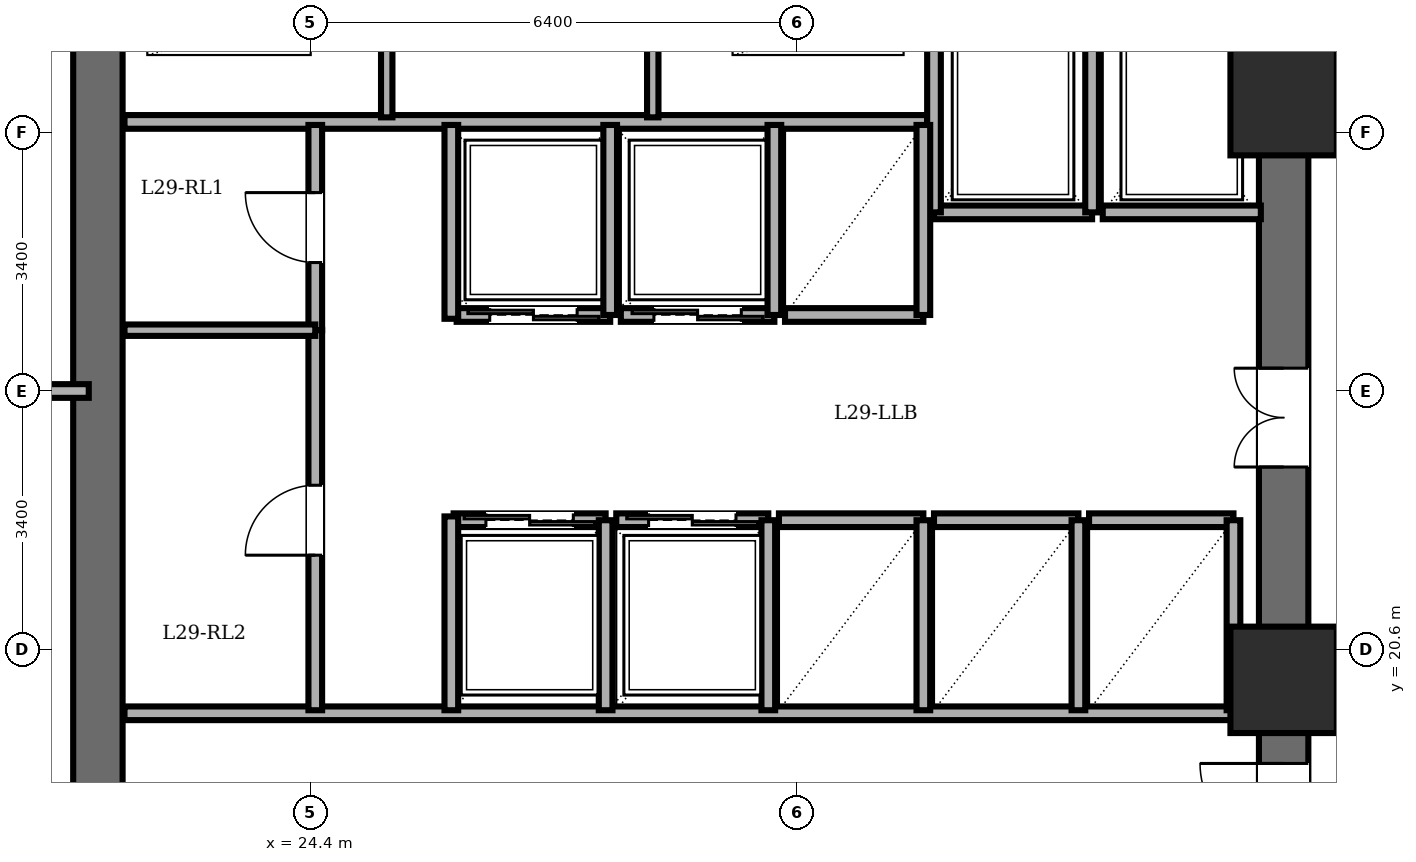
"""IFC4 building model, lengths in metres.
Left out: names, types, materials, properties, quantities, classifications, styles, units other than length and angle.
Written with IfcOpenShell. Run it as: python <this file> out.ifc"""

import sys

from ifc_helpers import new_model, si_unit, direction, frame, frame_2d, origin, origin_2d, place, context, subcontext, project, spatial, rectangle, extrude, element, fill, save


model = new_model("IFC4")
c1 = context("Model", 3, precision=1e-05, world=origin(), true_north=direction((0.0, 1.0)))
c2 = subcontext(c1, "Body", "Model", "MODEL_VIEW")
j1 = project(units=[si_unit("LENGTHUNIT", "METRE"), si_unit("PLANEANGLEUNIT", "RADIAN")], contexts=[c1])
p1 = place(None, origin())
s1 = spatial("IfcSite", under=j1, at=p1, CompositionType="ELEMENT")
p2 = place(p1, origin())
s2 = spatial("IfcBuilding", under=s1, at=p2, CompositionType="ELEMENT")
p3 = place(p2, frame((0.0, 0.0, 111.5)))
s3 = spatial("IfcBuildingStorey", under=s2, at=p3, CompositionType="ELEMENT", Elevation=111.5)
for number, where, z_axis, x_axis in (
    (1, (37.2, 20.2, 0.0), (0.0, 0.0, 1.0), (1.0, 0.0, 0.0)),
    (2, (37.2, 27.8, 0.0), (0.0, 0.0, 1.0), (1.0, 0.0, 0.0)),
):
    element("IfcColumn", number, at=place(p3, frame(where, z_axis=z_axis, x_axis=x_axis)), inside=s3, PredefinedType="COLUMN", context=c2, shape_type="SweptSolid", body=[
        extrude(rectangle(XDim=1.4, YDim=1.4, at=origin_2d()), origin(), (0.0, 0.0, 1.0), 3.6),
    ])
p4 = place(p3, frame((21.6, 14.4, 0.0), z_axis=(0.0, 0.0, 1.0), x_axis=(0.0, 1.0, 0.0)))
e3 = element("IfcWall", 3, at=p4, inside=s3, PredefinedType="SHEAR", context=c2, shape_type="SweptSolid", body=[
    extrude(rectangle(XDim=19.2, YDim=0.65, at=frame_2d((9.6, 0.0))), origin(), (0.0, 0.0, 1.0), 3.4),
])
p5 = place(p3, frame((37.2, 14.4, 0.0), z_axis=(0.0, 0.0, 1.0), x_axis=(0.0, 1.0, 0.0)))
e4 = element("IfcWall", 4, at=p5, inside=s3, PredefinedType="SHEAR", context=c2, shape_type="SweptSolid", body=[
    extrude(rectangle(XDim=19.2, YDim=0.65, at=frame_2d((9.6, 0.0))), origin(), (0.0, 0.0, 1.0), 3.4),
])
p6 = place(p5, frame((15.8, 0.0, 0.0)))
e5 = element("IfcOpeningElement", 5, at=p6, cuts=e4, PredefinedType="OPENING", context=c2, shape_type="SweptSolid", body=[
    extrude(rectangle(XDim=1.15, YDim=2.15, at=frame_2d((0.575, 1.075))), frame((0.0, 0.335, 0.0), z_axis=(0.0, -1.0, 0.0), x_axis=(1.0, 0.0, 0.0)), (0.0, 0.0, 1.0), 0.67),
])
p7 = place(p5, frame((3.6, 0.0, 0.0)))
e6 = element("IfcOpeningElement", 6, at=p7, cuts=e4, PredefinedType="OPENING", context=c2, shape_type="SweptSolid", body=[
    extrude(rectangle(XDim=1.1, YDim=2.15, at=frame_2d((0.55, 1.075))), frame((0.0, 0.335, 0.0), z_axis=(0.0, -1.0, 0.0), x_axis=(1.0, 0.0, 0.0)), (0.0, 0.0, 1.0), 0.67),
])
p8 = place(p5, frame((8.6, 0.0, 0.0)))
e7 = element("IfcOpeningElement", 7, at=p8, cuts=e4, PredefinedType="OPENING", context=c2, shape_type="SweptSolid", body=[
    extrude(rectangle(XDim=1.3, YDim=2.2, at=frame_2d((0.65, 1.1))), frame((0.0, 0.335, 0.0), z_axis=(0.0, -1.0, 0.0), x_axis=(1.0, 0.0, 0.0)), (0.0, 0.0, 1.0), 0.67),
])
p9 = place(p3, frame((21.95, 27.54, 0.0), z_axis=(0.0, 0.0, 1.0), x_axis=(1.0, 0.0, 0.0)))
e8 = element("IfcWall", 8, at=p9, inside=s3, PredefinedType="PARTITIONING", context=c2, shape_type="SweptSolid", body=[
    extrude(rectangle(XDim=10.56, YDim=0.18, at=frame_2d((5.28, 0.0))), origin(), (0.0, 0.0, 1.0), 3.4),
])
for number, where, z_axis, x_axis in (
    (9, (25.4, 27.6, 0.0), (0.0, 0.0, 1.0), (0.0, 1.0, 0.0)),
    (10, (28.9, 27.6, 0.0), (0.0, 0.0, 1.0), (0.0, 1.0, 0.0)),
):
    element("IfcWall", number, at=place(p3, frame(where, z_axis=z_axis, x_axis=x_axis)), inside=s3, PredefinedType="PARTITIONING", context=c2, shape_type="SweptSolid", body=[
        extrude(rectangle(XDim=1.52, YDim=0.15, at=frame_2d((0.76, 0.0))), origin(), (0.0, 0.0, 1.0), 3.4),
    ])
p10 = place(p3, frame((21.95, 19.76, 0.0), z_axis=(0.0, 0.0, 1.0), x_axis=(1.0, 0.0, 0.0)))
e11 = element("IfcWall", 11, at=p10, inside=s3, PredefinedType="PARTITIONING", context=c2, shape_type="SweptSolid", body=[
    extrude(rectangle(XDim=14.87, YDim=0.18, at=frame_2d((7.435, 0.0))), origin(), (0.0, 0.0, 1.0), 3.4),
])
p11 = place(p3, frame((34.68, 26.35, 0.0), z_axis=(0.0, 0.0, 1.0), x_axis=(-1.0, 0.0, 0.0)))
e12 = element("IfcWall", 12, at=p11, inside=s3, PredefinedType="PARTITIONING", context=c2, shape_type="SweptSolid", body=[
    extrude(rectangle(XDim=2.08, YDim=0.18, at=frame_2d((1.04, 0.0))), origin(), (0.0, 0.0, 1.0), 3.4),
])
for number, where, z_axis, x_axis in (
    (13, (34.68, 26.35, 0.0), (0.0, 0.0, 1.0), (0.0, 1.0, 0.0)),
    (14, (32.6, 29.08, 0.0), (0.0, 0.0, 1.0), (0.0, -1.0, 0.0)),
):
    element("IfcWall", number, at=place(p3, frame(where, z_axis=z_axis, x_axis=x_axis)), inside=s3, PredefinedType="PARTITIONING", context=c2, shape_type="SweptSolid", body=[
        extrude(rectangle(XDim=2.73, YDim=0.18, at=frame_2d((1.365, 0.0))), origin(), (0.0, 0.0, 1.0), 3.4),
    ])
p12 = place(p3, frame((36.9, 26.35, 0.0), z_axis=(0.0, 0.0, 1.0), x_axis=(-1.0, 0.0, 0.0)))
e15 = element("IfcWall", 15, at=p12, inside=s3, PredefinedType="PARTITIONING", context=c2, shape_type="SweptSolid", body=[
    extrude(rectangle(XDim=2.08, YDim=0.18, at=frame_2d((1.04, 0.0))), origin(), (0.0, 0.0, 1.0), 3.4),
])
p13 = place(p3, frame((28.34, 25.0, 0.0), z_axis=(0.0, 0.0, 1.0), x_axis=(-1.0, 0.0, 0.0)))
e16 = element("IfcWall", 16, at=p13, inside=s3, PredefinedType="PARTITIONING", context=c2, shape_type="SweptSolid", body=[
    extrude(rectangle(XDim=2.02, YDim=0.18, at=frame_2d((1.01, 0.0))), origin(), (0.0, 0.0, 1.0), 3.4),
])
p14 = place(p13, frame((0.435, 0.0, 0.0)))
e17 = element("IfcOpeningElement", 17, at=p14, cuts=e16, PredefinedType="OPENING", context=c2, shape_type="SweptSolid", body=[
    extrude(rectangle(XDim=1.15, YDim=2.2, at=frame_2d((0.575, 1.1))), frame((0.0, 0.1, 0.0), z_axis=(0.0, -1.0, 0.0), x_axis=(1.0, 0.0, 0.0)), (0.0, 0.0, 1.0), 0.2),
])
p15 = place(p3, frame((28.34, 25.0, 0.0), z_axis=(0.0, 0.0, 1.0), x_axis=(0.0, 1.0, 0.0)))
e18 = element("IfcWall", 18, at=p15, inside=s3, PredefinedType="PARTITIONING", context=c2, shape_type="SweptSolid", body=[
    extrude(rectangle(XDim=2.5, YDim=0.18, at=frame_2d((1.25, 0.0))), origin(), (0.0, 0.0, 1.0), 3.4),
])
p16 = place(p3, frame((30.5, 25.0, 0.0), z_axis=(0.0, 0.0, 1.0), x_axis=(-1.0, 0.0, 0.0)))
e19 = element("IfcWall", 19, at=p16, inside=s3, PredefinedType="PARTITIONING", context=c2, shape_type="SweptSolid", body=[
    extrude(rectangle(XDim=2.02, YDim=0.18, at=frame_2d((1.01, 0.0))), origin(), (0.0, 0.0, 1.0), 3.4),
])
p17 = place(p16, frame((0.435, 0.0, 0.0)))
e20 = element("IfcOpeningElement", 20, at=p17, cuts=e19, PredefinedType="OPENING", context=c2, shape_type="SweptSolid", body=[
    extrude(rectangle(XDim=1.15, YDim=2.2, at=frame_2d((0.575, 1.1))), frame((0.0, 0.1, 0.0), z_axis=(0.0, -1.0, 0.0), x_axis=(1.0, 0.0, 0.0)), (0.0, 0.0, 1.0), 0.2),
])
p18 = place(p3, frame((30.5, 25.0, 0.0), z_axis=(0.0, 0.0, 1.0), x_axis=(0.0, 1.0, 0.0)))
e21 = element("IfcWall", 21, at=p18, inside=s3, PredefinedType="PARTITIONING", context=c2, shape_type="SweptSolid", body=[
    extrude(rectangle(XDim=2.5, YDim=0.18, at=frame_2d((1.25, 0.0))), origin(), (0.0, 0.0, 1.0), 3.4),
])
p19 = place(p3, frame((26.28, 22.3, 0.0), z_axis=(0.0, 0.0, 1.0), x_axis=(1.0, 0.0, 0.0)))
e22 = element("IfcWall", 22, at=p19, inside=s3, PredefinedType="PARTITIONING", context=c2, shape_type="SweptSolid", body=[
    extrude(rectangle(XDim=2.0, YDim=0.18, at=frame_2d((1.0, 0.0))), origin(), (0.0, 0.0, 1.0), 3.4),
])
p20 = place(p19, frame((0.425, 0.0, 0.0)))
e23 = element("IfcOpeningElement", 23, at=p20, cuts=e22, PredefinedType="OPENING", context=c2, shape_type="SweptSolid", body=[
    extrude(rectangle(XDim=1.15, YDim=2.2, at=frame_2d((0.575, 1.1))), frame((0.0, 0.1, 0.0), z_axis=(0.0, -1.0, 0.0), x_axis=(1.0, 0.0, 0.0)), (0.0, 0.0, 1.0), 0.2),
])
p21 = place(p3, frame((28.28, 19.8, 0.0), z_axis=(0.0, 0.0, 1.0), x_axis=(0.0, 1.0, 0.0)))
e24 = element("IfcWall", 24, at=p21, inside=s3, PredefinedType="PARTITIONING", context=c2, shape_type="SweptSolid", body=[
    extrude(rectangle(XDim=2.5, YDim=0.18, at=frame_2d((1.25, 0.0))), origin(), (0.0, 0.0, 1.0), 3.4),
])
p22 = place(p3, frame((28.42, 22.3, 0.0), z_axis=(0.0, 0.0, 1.0), x_axis=(1.0, 0.0, 0.0)))
e25 = element("IfcWall", 25, at=p22, inside=s3, PredefinedType="PARTITIONING", context=c2, shape_type="SweptSolid", body=[
    extrude(rectangle(XDim=2.0, YDim=0.18, at=frame_2d((1.0, 0.0))), origin(), (0.0, 0.0, 1.0), 3.4),
])
p23 = place(p22, frame((0.425, 0.0, 0.0)))
e26 = element("IfcOpeningElement", 26, at=p23, cuts=e25, PredefinedType="OPENING", context=c2, shape_type="SweptSolid", body=[
    extrude(rectangle(XDim=1.15, YDim=2.2, at=frame_2d((0.575, 1.1))), frame((0.0, 0.1, 0.0), z_axis=(0.0, -1.0, 0.0), x_axis=(1.0, 0.0, 0.0)), (0.0, 0.0, 1.0), 0.2),
])
p24 = place(p3, frame((30.42, 19.8, 0.0), z_axis=(0.0, 0.0, 1.0), x_axis=(0.0, 1.0, 0.0)))
e27 = element("IfcWall", 27, at=p24, inside=s3, PredefinedType="PARTITIONING", context=c2, shape_type="SweptSolid", body=[
    extrude(rectangle(XDim=2.5, YDim=0.18, at=frame_2d((1.25, 0.0))), origin(), (0.0, 0.0, 1.0), 3.4),
])
p25 = place(p3, frame((32.46, 25.0, 0.0), z_axis=(0.0, 0.0, 1.0), x_axis=(-1.0, 0.0, 0.0)))
e28 = element("IfcWall", 28, at=p25, inside=s3, PredefinedType="PARTITIONING", context=c2, shape_type="SweptSolid", body=[
    extrude(rectangle(XDim=1.82, YDim=0.18, at=frame_2d((0.91, 0.0))), origin(), (0.0, 0.0, 1.0), 3.4),
])
p26 = place(p3, frame((32.46, 25.0, 0.0), z_axis=(0.0, 0.0, 1.0), x_axis=(0.0, 1.0, 0.0)))
e29 = element("IfcWall", 29, at=p26, inside=s3, PredefinedType="PARTITIONING", context=c2, shape_type="SweptSolid", body=[
    extrude(rectangle(XDim=2.5, YDim=0.18, at=frame_2d((1.25, 0.0))), origin(), (0.0, 0.0, 1.0), 3.4),
])
p27 = place(p3, frame((30.56, 22.3, 0.0), z_axis=(0.0, 0.0, 1.0), x_axis=(1.0, 0.0, 0.0)))
e30 = element("IfcWall", 30, at=p27, inside=s3, PredefinedType="PARTITIONING", context=c2, shape_type="SweptSolid", body=[
    extrude(rectangle(XDim=1.9, YDim=0.18, at=frame_2d((0.95, 0.0))), origin(), (0.0, 0.0, 1.0), 3.4),
])
p28 = place(p3, frame((32.46, 19.8, 0.0), z_axis=(0.0, 0.0, 1.0), x_axis=(0.0, 1.0, 0.0)))
e31 = element("IfcWall", 31, at=p28, inside=s3, PredefinedType="PARTITIONING", context=c2, shape_type="SweptSolid", body=[
    extrude(rectangle(XDim=2.5, YDim=0.18, at=frame_2d((1.25, 0.0))), origin(), (0.0, 0.0, 1.0), 3.4),
])
p29 = place(p3, frame((32.6, 22.3, 0.0), z_axis=(0.0, 0.0, 1.0), x_axis=(1.0, 0.0, 0.0)))
e32 = element("IfcWall", 32, at=p29, inside=s3, PredefinedType="PARTITIONING", context=c2, shape_type="SweptSolid", body=[
    extrude(rectangle(XDim=1.9, YDim=0.18, at=frame_2d((0.95, 0.0))), origin(), (0.0, 0.0, 1.0), 3.4),
])
p30 = place(p3, frame((34.5, 19.8, 0.0), z_axis=(0.0, 0.0, 1.0), x_axis=(0.0, 1.0, 0.0)))
e33 = element("IfcWall", 33, at=p30, inside=s3, PredefinedType="PARTITIONING", context=c2, shape_type="SweptSolid", body=[
    extrude(rectangle(XDim=2.5, YDim=0.18, at=frame_2d((1.25, 0.0))), origin(), (0.0, 0.0, 1.0), 3.4),
])
p31 = place(p3, frame((34.64, 22.3, 0.0), z_axis=(0.0, 0.0, 1.0), x_axis=(1.0, 0.0, 0.0)))
e34 = element("IfcWall", 34, at=p31, inside=s3, PredefinedType="PARTITIONING", context=c2, shape_type="SweptSolid", body=[
    extrude(rectangle(XDim=1.9, YDim=0.18, at=frame_2d((0.95, 0.0))), origin(), (0.0, 0.0, 1.0), 3.4),
])
p32 = place(p3, frame((36.54, 19.8, 0.0), z_axis=(0.0, 0.0, 1.0), x_axis=(0.0, 1.0, 0.0)))
e35 = element("IfcWall", 35, at=p32, inside=s3, PredefinedType="PARTITIONING", context=c2, shape_type="SweptSolid", body=[
    extrude(rectangle(XDim=2.5, YDim=0.18, at=frame_2d((1.25, 0.0))), origin(), (0.0, 0.0, 1.0), 3.4),
])
p33 = place(p3, frame((24.46, 24.8, 0.0), z_axis=(0.0, 0.0, 1.0), x_axis=(0.0, 1.0, 0.0)))
e36 = element("IfcWall", 36, at=p33, inside=s3, PredefinedType="PARTITIONING", context=c2, shape_type="SweptSolid", body=[
    extrude(rectangle(XDim=2.7, YDim=0.18, at=frame_2d((1.35, 0.0))), origin(), (0.0, 0.0, 1.0), 3.4),
])
p34 = place(p33, frame((0.89, 0.0, 0.0)))
e37 = element("IfcOpeningElement", 37, at=p34, cuts=e36, PredefinedType="OPENING", context=c2, shape_type="SweptSolid", body=[
    extrude(rectangle(XDim=0.92, YDim=2.1, at=frame_2d((0.46, 1.05))), frame((0.0, 0.1, 0.0), z_axis=(0.0, -1.0, 0.0), x_axis=(1.0, 0.0, 0.0)), (0.0, 0.0, 1.0), 0.2),
])
p35 = place(p3, frame((24.46, 19.8, 0.0), z_axis=(0.0, 0.0, 1.0), x_axis=(0.0, 1.0, 0.0)))
e38 = element("IfcWall", 38, at=p35, inside=s3, PredefinedType="PARTITIONING", context=c2, shape_type="SweptSolid", body=[
    extrude(rectangle(XDim=5.0, YDim=0.18, at=frame_2d((2.5, 0.0))), origin(), (0.0, 0.0, 1.0), 3.4),
])
p36 = place(p35, frame((2.04, 0.0, 0.0)))
e39 = element("IfcOpeningElement", 39, at=p36, cuts=e38, PredefinedType="OPENING", context=c2, shape_type="SweptSolid", body=[
    extrude(rectangle(XDim=0.92, YDim=2.1, at=frame_2d((0.46, 1.05))), frame((0.0, 0.1, 0.0), z_axis=(0.0, -1.0, 0.0), x_axis=(1.0, 0.0, 0.0)), (0.0, 0.0, 1.0), 0.2),
])
p37 = place(p3, frame((21.95, 24.8, 0.0), z_axis=(0.0, 0.0, 1.0), x_axis=(1.0, 0.0, 0.0)))
e40 = element("IfcWall", 40, at=p37, inside=s3, PredefinedType="PARTITIONING", context=c2, shape_type="SweptSolid", body=[
    extrude(rectangle(XDim=2.51, YDim=0.15, at=frame_2d((1.255, 0.0))), origin(), (0.0, 0.0, 1.0), 3.4),
])
for number, where, z_axis, x_axis in (
    (41, (26.25, 24.95, 0.0), (0.0, 0.0, 1.0), (0.0, 1.0, 0.0)),
    (42, (26.25, 19.8, 0.0), (0.0, 0.0, 1.0), (0.0, 1.0, 0.0)),
):
    element("IfcWall", number, at=place(p3, frame(where, z_axis=z_axis, x_axis=x_axis)), inside=s3, PredefinedType="PARTITIONING", context=c2, shape_type="SweptSolid", body=[
        extrude(rectangle(XDim=2.55, YDim=0.18, at=frame_2d((1.275, 0.0))), origin(), (0.0, 0.0, 1.0), 3.4),
    ])
p38 = place(p3, frame((8.8, 24.0, 0.0), z_axis=(0.0, 0.0, 1.0), x_axis=(1.0, 0.0, 0.0)))
e43 = element("IfcWall", 43, at=p38, inside=s3, PredefinedType="PARTITIONING", context=c2, shape_type="SweptSolid", body=[
    extrude(rectangle(XDim=12.68, YDim=0.18, at=frame_2d((6.34, 0.0))), origin(), (0.0, 0.0, 1.0), 3.4),
])
p39 = place(p7, origin())
e44 = element("IfcDoor", 44, at=p39, inside=s3, OperationType="SINGLE_SWING_RIGHT", PredefinedType="DOOR", context=c2, shape_type="SweptSolid", body=[
    extrude(rectangle(XDim=1.1, YDim=2.15, at=frame_2d((0.55, 1.075))), frame((0.0, 0.025, 0.0), z_axis=(0.0, -1.0, 0.0), x_axis=(1.0, 0.0, 0.0)), (0.0, 0.0, 1.0), 0.05),
])
fill(e6, e44)
p40 = place(p14, origin())
e45 = element("IfcDoor", 45, at=p40, inside=s3, OperationType="DOUBLE_DOOR_SLIDING", PredefinedType="DOOR", context=c2, shape_type="SweptSolid", body=[
    extrude(rectangle(XDim=1.15, YDim=2.2, at=frame_2d((0.575, 1.1))), frame((0.0, 0.025, 0.0), z_axis=(0.0, -1.0, 0.0), x_axis=(1.0, 0.0, 0.0)), (0.0, 0.0, 1.0), 0.05),
])
fill(e17, e45)
p41 = place(p17, origin())
e46 = element("IfcDoor", 46, at=p41, inside=s3, OperationType="DOUBLE_DOOR_SLIDING", PredefinedType="DOOR", context=c2, shape_type="SweptSolid", body=[
    extrude(rectangle(XDim=1.15, YDim=2.2, at=frame_2d((0.575, 1.1))), frame((0.0, 0.025, 0.0), z_axis=(0.0, -1.0, 0.0), x_axis=(1.0, 0.0, 0.0)), (0.0, 0.0, 1.0), 0.05),
])
fill(e20, e46)
p42 = place(p20, origin())
e47 = element("IfcDoor", 47, at=p42, inside=s3, OperationType="DOUBLE_DOOR_SLIDING", PredefinedType="DOOR", context=c2, shape_type="SweptSolid", body=[
    extrude(rectangle(XDim=1.15, YDim=2.2, at=frame_2d((0.575, 1.1))), frame((0.0, 0.025, 0.0), z_axis=(0.0, -1.0, 0.0), x_axis=(1.0, 0.0, 0.0)), (0.0, 0.0, 1.0), 0.05),
])
fill(e23, e47)
p43 = place(p23, origin())
e48 = element("IfcDoor", 48, at=p43, inside=s3, OperationType="DOUBLE_DOOR_SLIDING", PredefinedType="DOOR", context=c2, shape_type="SweptSolid", body=[
    extrude(rectangle(XDim=1.15, YDim=2.2, at=frame_2d((0.575, 1.1))), frame((0.0, 0.025, 0.0), z_axis=(0.0, -1.0, 0.0), x_axis=(1.0, 0.0, 0.0)), (0.0, 0.0, 1.0), 0.05),
])
fill(e26, e48)
p44 = place(p34, origin())
e49 = element("IfcDoor", 49, at=p44, inside=s3, OperationType="SINGLE_SWING_RIGHT", PredefinedType="DOOR", context=c2, shape_type="SweptSolid", body=[
    extrude(rectangle(XDim=0.92, YDim=2.1, at=frame_2d((0.46, 1.05))), frame((0.0, 0.025, 0.0), z_axis=(0.0, -1.0, 0.0), x_axis=(1.0, 0.0, 0.0)), (0.0, 0.0, 1.0), 0.05),
])
fill(e37, e49)
p45 = place(p36, origin())
e50 = element("IfcDoor", 50, at=p45, inside=s3, OperationType="SINGLE_SWING_LEFT", PredefinedType="DOOR", context=c2, shape_type="SweptSolid", body=[
    extrude(rectangle(XDim=0.92, YDim=2.1, at=frame_2d((0.46, 1.05))), frame((0.0, 0.025, 0.0), z_axis=(0.0, -1.0, 0.0), x_axis=(1.0, 0.0, 0.0)), (0.0, 0.0, 1.0), 0.05),
])
fill(e39, e50)
p46 = place(p8, origin())
e51 = element("IfcDoor", 51, at=p46, inside=s3, OperationType="DOUBLE_DOOR_SINGLE_SWING", PredefinedType="DOOR", context=c2, shape_type="SweptSolid", body=[
    extrude(rectangle(XDim=1.3, YDim=2.2, at=frame_2d((0.65, 1.1))), frame((0.0, 0.025, 0.0), z_axis=(0.0, -1.0, 0.0), x_axis=(1.0, 0.0, 0.0)), (0.0, 0.0, 1.0), 0.05),
])
fill(e7, e51)
save(model, sys.argv[1])
